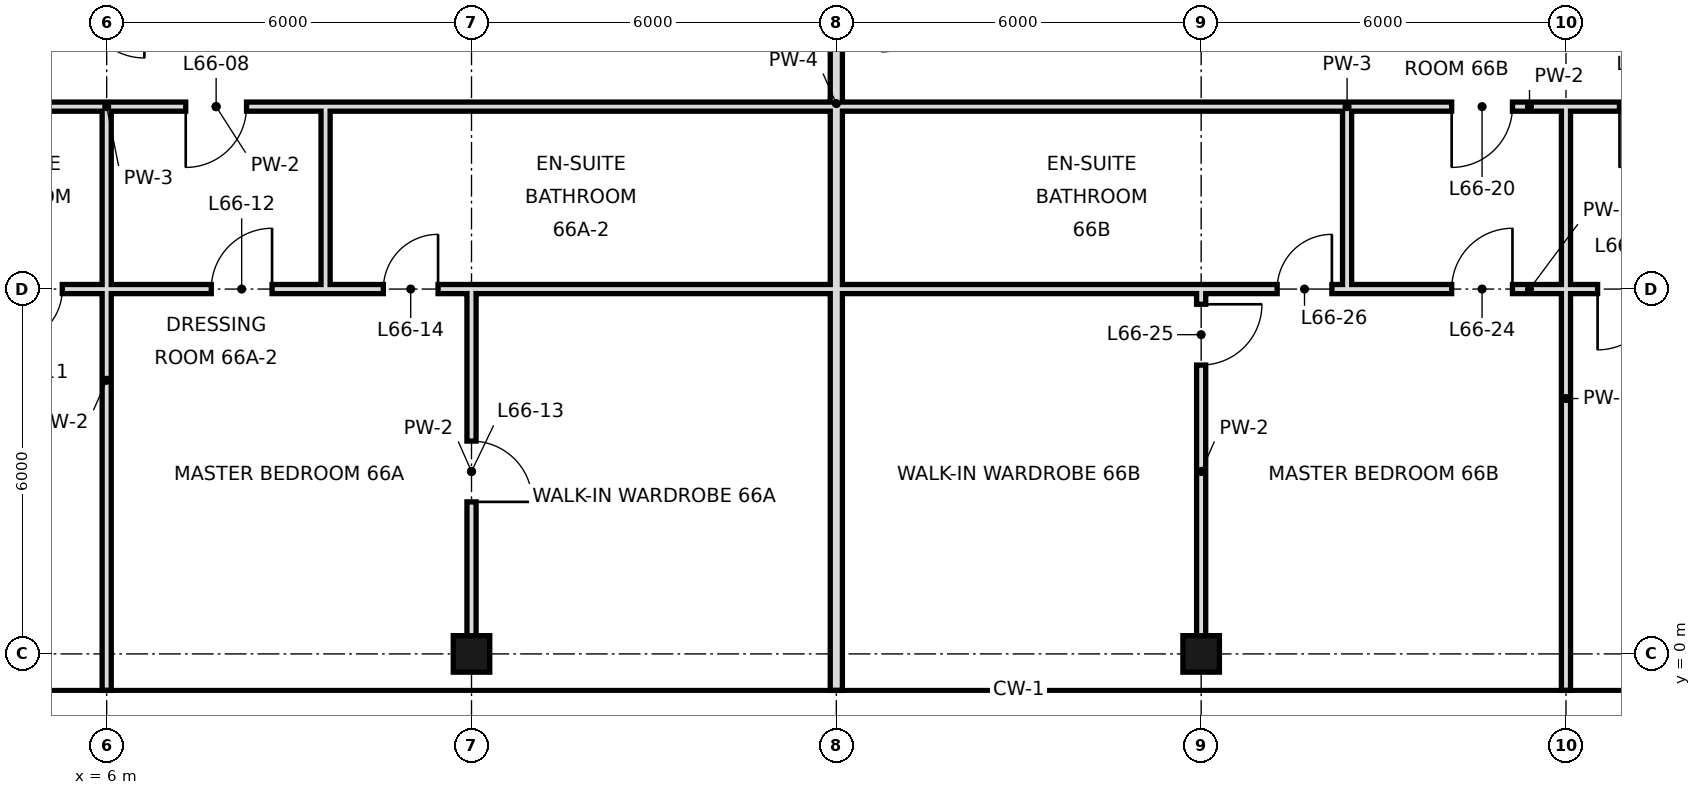
"""IFC4 building model, lengths in metres.
Left out: names, types, materials, properties, quantities, classifications, styles, units other than length and angle.
Written with IfcOpenShell. Run it as: python <this file> out.ifc"""

import sys

from ifc_helpers import new_model, si_unit, direction, frame, frame_2d, origin, origin_2d, place, context, subcontext, project, spatial, rectangle, hollow_rectangle, extrude, element, fill, save


model = new_model("IFC4")
c1 = context("Model", 3, precision=1e-05, world=origin(), true_north=direction((0.0, 1.0)))
c2 = subcontext(c1, "Body", "Model", "MODEL_VIEW")
j1 = project(units=[si_unit("LENGTHUNIT", "METRE"), si_unit("PLANEANGLEUNIT", "RADIAN")], contexts=[c1])
p1 = place(None, origin())
s1 = spatial("IfcSite", under=j1, at=p1, CompositionType="ELEMENT")
p2 = place(p1, origin())
s2 = spatial("IfcBuilding", under=s1, at=p2, CompositionType="ELEMENT")
p3 = place(p2, frame((0.0, 0.0, 277.4)))
s3 = spatial("IfcBuildingStorey", under=s2, at=p3, CompositionType="ELEMENT", Elevation=277.4)
for number, where, z_axis, x_axis in (
    (1, (12.0, 0.0, 0.0), (0.0, 0.0, 1.0), (1.0, 0.0, 0.0)),
    (2, (24.0, 0.0, 0.0), (0.0, 0.0, 1.0), (1.0, 0.0, 0.0)),
):
    element("IfcColumn", number, at=place(p3, frame(where, z_axis=z_axis, x_axis=x_axis)), inside=s3, PredefinedType="COLUMN", context=c2, shape_type="SweptSolid", body=[
        extrude(hollow_rectangle(XDim=0.6, YDim=0.6, WallThickness=0.028, at=origin_2d()), origin(), (0.0, 0.0, 1.0), 4.4),
    ])
p4 = place(p3, frame((12.0, 0.0, 0.0), z_axis=(0.0, 0.0, 1.0), x_axis=(0.0, 1.0, 0.0)))
e3 = element("IfcWall", 3, at=p4, inside=s3, PredefinedType="PARTITIONING", context=c2, shape_type="SweptSolid", body=[
    extrude(rectangle(XDim=6.0, YDim=0.15, at=frame_2d((3.0, 0.0))), origin(), (0.0, 0.0, 1.0), 3.4),
])
p5 = place(p4, frame((2.5, 0.0, 0.0)))
e4 = element("IfcOpeningElement", 4, at=p5, cuts=e3, PredefinedType="OPENING", context=c2, shape_type="SweptSolid", body=[
    extrude(rectangle(XDim=1.0, YDim=2.4, at=frame_2d((0.5, 1.2))), frame((0.0, 0.085, 0.0), z_axis=(0.0, -1.0, 0.0), x_axis=(1.0, 0.0, 0.0)), (0.0, 0.0, 1.0), 0.17),
])
p6 = place(p3, frame((18.0, -0.6, 0.0), z_axis=(0.0, 0.0, 1.0), x_axis=(0.0, 1.0, 0.0)))
e5 = element("IfcWall", 5, at=p6, inside=s3, PredefinedType="SOLIDWALL", context=c2, shape_type="SweptSolid", body=[
    extrude(rectangle(XDim=19.3, YDim=0.2, at=frame_2d((9.65, 0.0))), origin(), (0.0, 0.0, 1.0), 3.4),
])
p7 = place(p3, frame((24.0, 0.0, 0.0), z_axis=(0.0, 0.0, 1.0), x_axis=(0.0, 1.0, 0.0)))
e6 = element("IfcWall", 6, at=p7, inside=s3, PredefinedType="PARTITIONING", context=c2, shape_type="SweptSolid", body=[
    extrude(rectangle(XDim=6.0, YDim=0.15, at=frame_2d((3.0, 0.0))), origin(), (0.0, 0.0, 1.0), 3.4),
])
p8 = place(p7, frame((4.75, 0.0, 0.0)))
e7 = element("IfcOpeningElement", 7, at=p8, cuts=e6, PredefinedType="OPENING", context=c2, shape_type="SweptSolid", body=[
    extrude(rectangle(XDim=1.0, YDim=2.4, at=frame_2d((0.5, 1.2))), frame((0.0, 0.085, 0.0), z_axis=(0.0, -1.0, 0.0), x_axis=(1.0, 0.0, 0.0)), (0.0, 0.0, 1.0), 0.17),
])
p9 = place(p3, frame((26.4, 6.0, 0.0), z_axis=(0.0, 0.0, 1.0), x_axis=(0.0, 1.0, 0.0)))
e8 = element("IfcWall", 8, at=p9, inside=s3, PredefinedType="PARTITIONING", context=c2, shape_type="SweptSolid", body=[
    extrude(rectangle(XDim=3.0, YDim=0.15, at=frame_2d((1.5, 0.0))), origin(), (0.0, 0.0, 1.0), 4.1),
])
p10 = place(p3, frame((30.0, -0.6, 0.0), z_axis=(0.0, 0.0, 1.0), x_axis=(0.0, 1.0, 0.0)))
e9 = element("IfcWall", 9, at=p10, inside=s3, PredefinedType="PARTITIONING", context=c2, shape_type="SweptSolid", body=[
    extrude(rectangle(XDim=9.6, YDim=0.15, at=frame_2d((4.8, 0.0))), origin(), (0.0, 0.0, 1.0), 3.4),
])
p11 = place(p3, frame((6.0, -0.6, 0.0), z_axis=(0.0, 0.0, 1.0), x_axis=(0.0, 1.0, 0.0)))
e10 = element("IfcWall", 10, at=p11, inside=s3, PredefinedType="PARTITIONING", context=c2, shape_type="SweptSolid", body=[
    extrude(rectangle(XDim=6.6, YDim=0.15, at=frame_2d((3.3, 0.0))), origin(), (0.0, 0.0, 1.0), 3.4),
])
p12 = place(p3, frame((6.0, 6.0, 0.0), z_axis=(0.0, 0.0, 1.0), x_axis=(0.0, 1.0, 0.0)))
e11 = element("IfcWall", 11, at=p12, inside=s3, PredefinedType="PARTITIONING", context=c2, shape_type="SweptSolid", body=[
    extrude(rectangle(XDim=3.0, YDim=0.15, at=frame_2d((1.5, 0.0))), origin(), (0.0, 0.0, 1.0), 3.4),
])
p13 = place(p3, frame((9.6, 6.0, 0.0), z_axis=(0.0, 0.0, 1.0), x_axis=(0.0, 1.0, 0.0)))
e12 = element("IfcWall", 12, at=p13, inside=s3, PredefinedType="PARTITIONING", context=c2, shape_type="SweptSolid", body=[
    extrude(rectangle(XDim=3.0, YDim=0.15, at=frame_2d((1.5, 0.0))), origin(), (0.0, 0.0, 1.0), 4.1),
])
p14 = place(p3, frame((6.0, 6.0, 0.0), z_axis=(0.0, 0.0, 1.0), x_axis=(1.0, 0.0, 0.0)))
e13 = element("IfcWall", 13, at=p14, inside=s3, PredefinedType="PARTITIONING", context=c2, shape_type="SweptSolid", body=[
    extrude(rectangle(XDim=3.6, YDim=0.15, at=frame_2d((1.8, 0.0))), origin(), (0.0, 0.0, 1.0), 3.65),
])
p15 = place(p14, frame((1.72, 0.0, 0.0)))
e14 = element("IfcOpeningElement", 14, at=p15, cuts=e13, PredefinedType="OPENING", context=c2, shape_type="SweptSolid", body=[
    extrude(rectangle(XDim=1.0, YDim=2.4, at=frame_2d((0.5, 1.2))), frame((0.0, 0.085, 0.0), z_axis=(0.0, -1.0, 0.0), x_axis=(1.0, 0.0, 0.0)), (0.0, 0.0, 1.0), 0.17),
])
p16 = place(p3, frame((26.4, 6.0, 0.0), z_axis=(0.0, 0.0, 1.0), x_axis=(1.0, 0.0, 0.0)))
e15 = element("IfcWall", 15, at=p16, inside=s3, PredefinedType="PARTITIONING", context=c2, shape_type="SweptSolid", body=[
    extrude(rectangle(XDim=6.0, YDim=0.15, at=frame_2d((3.0, 0.0))), origin(), (0.0, 0.0, 1.0), 3.65),
])
p17 = place(p16, frame((1.72, 0.0, 0.0)))
e16 = element("IfcOpeningElement", 16, at=p17, cuts=e15, PredefinedType="OPENING", context=c2, shape_type="SweptSolid", body=[
    extrude(rectangle(XDim=1.0, YDim=2.4, at=frame_2d((0.5, 1.2))), frame((0.0, 0.085, 0.0), z_axis=(0.0, -1.0, 0.0), x_axis=(1.0, 0.0, 0.0)), (0.0, 0.0, 1.0), 0.17),
])
p18 = place(p16, frame((4.12, 0.0, 0.0)))
e17 = element("IfcOpeningElement", 17, at=p18, cuts=e15, PredefinedType="OPENING", context=c2, shape_type="SweptSolid", body=[
    extrude(rectangle(XDim=1.0, YDim=2.4, at=frame_2d((0.5, 1.2))), frame((0.0, 0.085, 0.0), z_axis=(0.0, -1.0, 0.0), x_axis=(1.0, 0.0, 0.0)), (0.0, 0.0, 1.0), 0.17),
])
p19 = place(p3, frame((3.0, 6.0, 0.0), z_axis=(0.0, 0.0, 1.0), x_axis=(1.0, 0.0, 0.0)))
e18 = element("IfcWall", 18, at=p19, inside=s3, PredefinedType="PARTITIONING", context=c2, shape_type="SweptSolid", body=[
    extrude(rectangle(XDim=3.0, YDim=0.15, at=frame_2d((1.5, 0.0))), origin(), (0.0, 0.0, 1.0), 3.65),
])
p20 = place(p19, frame((1.37, 0.0, 0.0)))
e19 = element("IfcOpeningElement", 19, at=p20, cuts=e18, PredefinedType="OPENING", context=c2, shape_type="SweptSolid", body=[
    extrude(rectangle(XDim=0.9, YDim=2.4, at=frame_2d((0.45, 1.2))), frame((0.0, 0.085, 0.0), z_axis=(0.0, -1.0, 0.0), x_axis=(1.0, 0.0, 0.0)), (0.0, 0.0, 1.0), 0.17),
])
p21 = place(p3, frame((9.6, 6.0, 0.0), z_axis=(0.0, 0.0, 1.0), x_axis=(1.0, 0.0, 0.0)))
e20 = element("IfcWall", 20, at=p21, inside=s3, PredefinedType="PARTITIONING", context=c2, shape_type="SweptSolid", body=[
    extrude(rectangle(XDim=16.8, YDim=0.15, at=frame_2d((8.4, 0.0))), origin(), (0.0, 0.0, 1.0), 3.65),
])
p22 = place(p21, frame((0.95, 0.0, 0.0)))
e21 = element("IfcOpeningElement", 21, at=p22, cuts=e20, PredefinedType="OPENING", context=c2, shape_type="SweptSolid", body=[
    extrude(rectangle(XDim=0.9, YDim=2.4, at=frame_2d((0.45, 1.2))), frame((0.0, 0.085, 0.0), z_axis=(0.0, -1.0, 0.0), x_axis=(1.0, 0.0, 0.0)), (0.0, 0.0, 1.0), 0.17),
])
p23 = place(p21, frame((15.65, 0.0, 0.0)))
e22 = element("IfcOpeningElement", 22, at=p23, cuts=e20, PredefinedType="OPENING", context=c2, shape_type="SweptSolid", body=[
    extrude(rectangle(XDim=0.9, YDim=2.4, at=frame_2d((0.45, 1.2))), frame((0.0, 0.085, 0.0), z_axis=(0.0, -1.0, 0.0), x_axis=(1.0, 0.0, 0.0)), (0.0, 0.0, 1.0), 0.17),
])
p24 = place(p3, frame((6.0, 9.0, 0.0), z_axis=(0.0, 0.0, 1.0), x_axis=(1.0, 0.0, 0.0)))
e23 = element("IfcWall", 23, at=p24, inside=s3, PredefinedType="PARTITIONING", context=c2, shape_type="SweptSolid", body=[
    extrude(rectangle(XDim=3.6, YDim=0.15, at=frame_2d((1.8, 0.0))), origin(), (0.0, 0.0, 1.0), 4.1),
])
p25 = place(p24, frame((1.3, 0.0, 0.0)))
e24 = element("IfcOpeningElement", 24, at=p25, cuts=e23, PredefinedType="OPENING", context=c2, shape_type="SweptSolid", body=[
    extrude(rectangle(XDim=1.0, YDim=2.4, at=frame_2d((0.5, 1.2))), frame((0.0, 0.085, 0.0), z_axis=(0.0, -1.0, 0.0), x_axis=(1.0, 0.0, 0.0)), (0.0, 0.0, 1.0), 0.17),
])
p26 = place(p3, frame((26.4, 9.0, 0.0), z_axis=(0.0, 0.0, 1.0), x_axis=(1.0, 0.0, 0.0)))
e25 = element("IfcWall", 25, at=p26, inside=s3, PredefinedType="PARTITIONING", context=c2, shape_type="SweptSolid", body=[
    extrude(rectangle(XDim=6.0, YDim=0.15, at=frame_2d((3.0, 0.0))), origin(), (0.0, 0.0, 1.0), 4.1),
])
p27 = place(p26, frame((1.72, 0.0, 0.0)))
e26 = element("IfcOpeningElement", 26, at=p27, cuts=e25, PredefinedType="OPENING", context=c2, shape_type="SweptSolid", body=[
    extrude(rectangle(XDim=1.0, YDim=2.4, at=frame_2d((0.5, 1.2))), frame((0.0, 0.085, 0.0), z_axis=(0.0, -1.0, 0.0), x_axis=(1.0, 0.0, 0.0)), (0.0, 0.0, 1.0), 0.17),
])
p28 = place(p26, frame((4.48, 0.0, 0.0)))
e27 = element("IfcOpeningElement", 27, at=p28, cuts=e25, PredefinedType="OPENING", context=c2, shape_type="SweptSolid", body=[
    extrude(rectangle(XDim=1.0, YDim=2.4, at=frame_2d((0.5, 1.2))), frame((0.0, 0.085, 0.0), z_axis=(0.0, -1.0, 0.0), x_axis=(1.0, 0.0, 0.0)), (0.0, 0.0, 1.0), 0.17),
])
p29 = place(p3, frame((3.0, 9.0, 0.0), z_axis=(0.0, 0.0, 1.0), x_axis=(1.0, 0.0, 0.0)))
e28 = element("IfcWall", 28, at=p29, inside=s3, PredefinedType="PARTITIONING", context=c2, shape_type="SweptSolid", body=[
    extrude(rectangle(XDim=3.0, YDim=0.15, at=frame_2d((1.5, 0.0))), origin(), (0.0, 0.0, 1.0), 4.1),
])
p30 = place(p3, frame((9.6, 9.0, 0.0), z_axis=(0.0, 0.0, 1.0), x_axis=(1.0, 0.0, 0.0)))
e29 = element("IfcWall", 29, at=p30, inside=s3, PredefinedType="PARTITIONING", context=c2, shape_type="SweptSolid", body=[
    extrude(rectangle(XDim=16.8, YDim=0.15, at=frame_2d((8.4, 0.0))), origin(), (0.0, 0.0, 1.0), 4.1),
])
p31 = place(p25, frame((1.0, 0.0, 0.0), z_axis=(0.0, 0.0, 1.0), x_axis=(-1.0, 0.0, 0.0)))
e30 = element("IfcDoor", 30, at=p31, inside=s3, OperationType="SINGLE_SWING_RIGHT", PredefinedType="DOOR", context=c2, shape_type="SweptSolid", body=[
    extrude(rectangle(XDim=1.0, YDim=2.4, at=frame_2d((0.5, 1.2))), frame((0.0, 0.025, 0.0), z_axis=(0.0, -1.0, 0.0), x_axis=(1.0, 0.0, 0.0)), (0.0, 0.0, 1.0), 0.05),
])
fill(e24, e30)
p32 = place(p20, frame((0.9, 0.0, 0.0), z_axis=(0.0, 0.0, 1.0), x_axis=(-1.0, 0.0, 0.0)))
e31 = element("IfcDoor", 31, at=p32, inside=s3, OperationType="SINGLE_SWING_RIGHT", PredefinedType="DOOR", context=c2, shape_type="SweptSolid", body=[
    extrude(rectangle(XDim=0.9, YDim=2.4, at=frame_2d((0.45, 1.2))), frame((0.0, 0.025, 0.0), z_axis=(0.0, -1.0, 0.0), x_axis=(1.0, 0.0, 0.0)), (0.0, 0.0, 1.0), 0.05),
])
fill(e19, e31)
p33 = place(p15, frame((1.0, 0.0, 0.0), z_axis=(0.0, 0.0, 1.0), x_axis=(-1.0, 0.0, 0.0)))
e32 = element("IfcDoor", 32, at=p33, inside=s3, OperationType="SINGLE_SWING_LEFT", PredefinedType="DOOR", context=c2, shape_type="SweptSolid", body=[
    extrude(rectangle(XDim=1.0, YDim=2.4, at=frame_2d((0.5, 1.2))), frame((0.0, 0.025, 0.0), z_axis=(0.0, -1.0, 0.0), x_axis=(1.0, 0.0, 0.0)), (0.0, 0.0, 1.0), 0.05),
])
fill(e14, e32)
p34 = place(p5, frame((1.0, 0.0, 0.0), z_axis=(0.0, 0.0, 1.0), x_axis=(-1.0, 0.0, 0.0)))
e33 = element("IfcDoor", 33, at=p34, inside=s3, OperationType="SINGLE_SWING_RIGHT", PredefinedType="DOOR", context=c2, shape_type="SweptSolid", body=[
    extrude(rectangle(XDim=1.0, YDim=2.4, at=frame_2d((0.5, 1.2))), frame((0.0, 0.025, 0.0), z_axis=(0.0, -1.0, 0.0), x_axis=(1.0, 0.0, 0.0)), (0.0, 0.0, 1.0), 0.05),
])
fill(e4, e33)
p35 = place(p22, frame((0.9, 0.0, 0.0), z_axis=(0.0, 0.0, 1.0), x_axis=(-1.0, 0.0, 0.0)))
e34 = element("IfcDoor", 34, at=p35, inside=s3, OperationType="SINGLE_SWING_LEFT", PredefinedType="DOOR", context=c2, shape_type="SweptSolid", body=[
    extrude(rectangle(XDim=0.9, YDim=2.4, at=frame_2d((0.45, 1.2))), frame((0.0, 0.025, 0.0), z_axis=(0.0, -1.0, 0.0), x_axis=(1.0, 0.0, 0.0)), (0.0, 0.0, 1.0), 0.05),
])
fill(e21, e34)
p36 = place(p27, frame((1.0, 0.0, 0.0), z_axis=(0.0, 0.0, 1.0), x_axis=(-1.0, 0.0, 0.0)))
e35 = element("IfcDoor", 35, at=p36, inside=s3, OperationType="SINGLE_SWING_RIGHT", PredefinedType="DOOR", context=c2, shape_type="SweptSolid", body=[
    extrude(rectangle(XDim=1.0, YDim=2.4, at=frame_2d((0.5, 1.2))), frame((0.0, 0.025, 0.0), z_axis=(0.0, -1.0, 0.0), x_axis=(1.0, 0.0, 0.0)), (0.0, 0.0, 1.0), 0.05),
])
fill(e26, e35)
p37 = place(p28, frame((1.0, 0.0, 0.0), z_axis=(0.0, 0.0, 1.0), x_axis=(-1.0, 0.0, 0.0)))
e36 = element("IfcDoor", 36, at=p37, inside=s3, OperationType="SINGLE_SWING_RIGHT", PredefinedType="DOOR", context=c2, shape_type="SweptSolid", body=[
    extrude(rectangle(XDim=1.0, YDim=2.4, at=frame_2d((0.5, 1.2))), frame((0.0, 0.025, 0.0), z_axis=(0.0, -1.0, 0.0), x_axis=(1.0, 0.0, 0.0)), (0.0, 0.0, 1.0), 0.05),
])
fill(e27, e36)
p38 = place(p17, frame((1.0, 0.0, 0.0), z_axis=(0.0, 0.0, 1.0), x_axis=(-1.0, 0.0, 0.0)))
e37 = element("IfcDoor", 37, at=p38, inside=s3, OperationType="SINGLE_SWING_LEFT", PredefinedType="DOOR", context=c2, shape_type="SweptSolid", body=[
    extrude(rectangle(XDim=1.0, YDim=2.4, at=frame_2d((0.5, 1.2))), frame((0.0, 0.025, 0.0), z_axis=(0.0, -1.0, 0.0), x_axis=(1.0, 0.0, 0.0)), (0.0, 0.0, 1.0), 0.05),
])
fill(e16, e37)
p39 = place(p8, origin())
e38 = element("IfcDoor", 38, at=p39, inside=s3, OperationType="SINGLE_SWING_RIGHT", PredefinedType="DOOR", context=c2, shape_type="SweptSolid", body=[
    extrude(rectangle(XDim=1.0, YDim=2.4, at=frame_2d((0.5, 1.2))), frame((0.0, 0.025, 0.0), z_axis=(0.0, -1.0, 0.0), x_axis=(1.0, 0.0, 0.0)), (0.0, 0.0, 1.0), 0.05),
])
fill(e7, e38)
p40 = place(p23, frame((0.9, 0.0, 0.0), z_axis=(0.0, 0.0, 1.0), x_axis=(-1.0, 0.0, 0.0)))
e39 = element("IfcDoor", 39, at=p40, inside=s3, OperationType="SINGLE_SWING_LEFT", PredefinedType="DOOR", context=c2, shape_type="SweptSolid", body=[
    extrude(rectangle(XDim=0.9, YDim=2.4, at=frame_2d((0.45, 1.2))), frame((0.0, 0.025, 0.0), z_axis=(0.0, -1.0, 0.0), x_axis=(1.0, 0.0, 0.0)), (0.0, 0.0, 1.0), 0.05),
])
fill(e22, e39)
p41 = place(p18, frame((1.0, 0.0, 0.0), z_axis=(0.0, 0.0, 1.0), x_axis=(-1.0, 0.0, 0.0)))
e40 = element("IfcDoor", 40, at=p41, inside=s3, OperationType="SINGLE_SWING_RIGHT", PredefinedType="DOOR", context=c2, shape_type="SweptSolid", body=[
    extrude(rectangle(XDim=1.0, YDim=2.4, at=frame_2d((0.5, 1.2))), frame((0.0, 0.025, 0.0), z_axis=(0.0, -1.0, 0.0), x_axis=(1.0, 0.0, 0.0)), (0.0, 0.0, 1.0), 0.05),
])
fill(e17, e40)
save(model, sys.argv[1])
